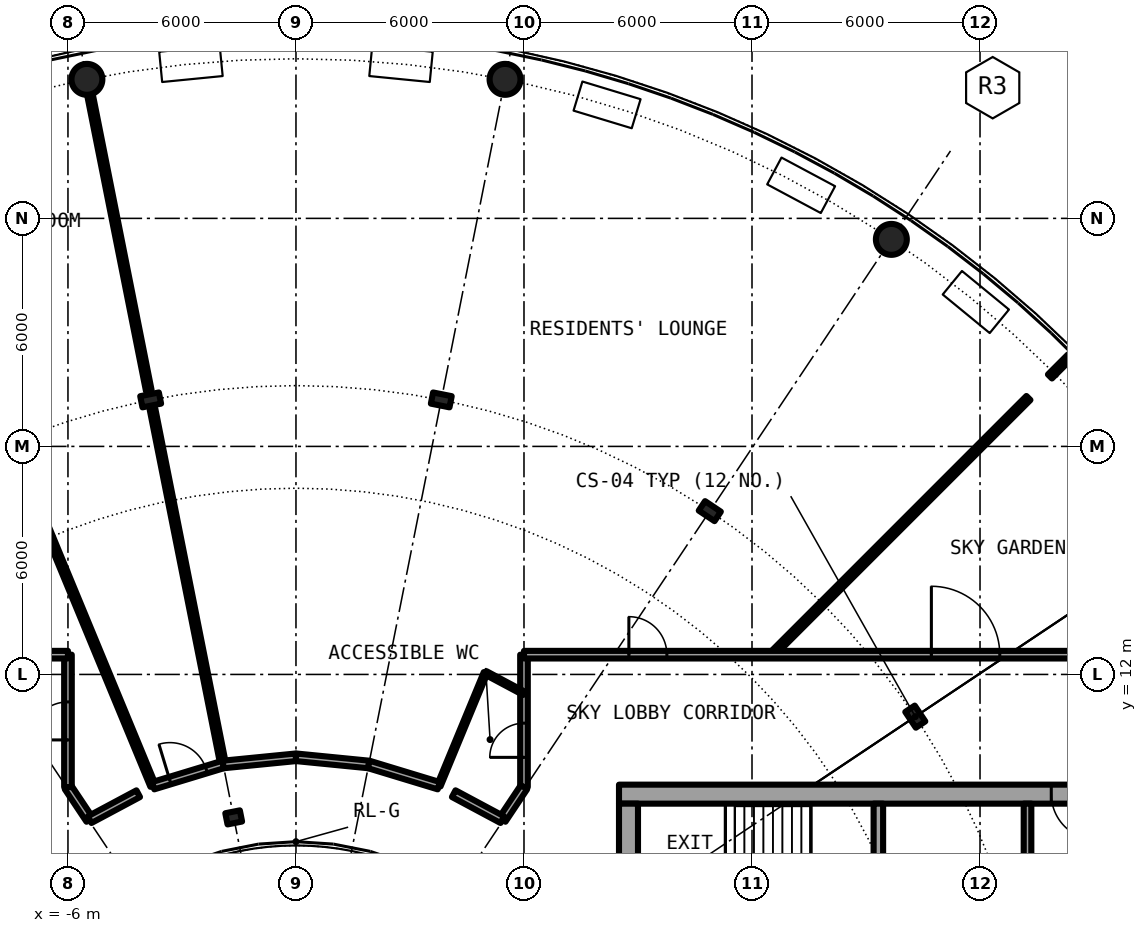
"""IFC4 building model, lengths in metres.
Left out: names, types, materials, properties, quantities, classifications, styles, units other than length and angle.
Written with IfcOpenShell. Run it as: python <this file> out.ifc"""

import sys

from ifc_helpers import new_model, si_unit, direction, frame, frame_2d, origin, origin_2d, place, context, subcontext, project, spatial, rectangle, hollow_circle, i_section, extrude, element, fill, save


model = new_model("IFC4")
c1 = context("Model", 3, precision=1e-05, world=origin(), true_north=direction((0.0, 1.0)))
c2 = subcontext(c1, "Body", "Model", "MODEL_VIEW")
j1 = project(units=[si_unit("LENGTHUNIT", "METRE"), si_unit("PLANEANGLEUNIT", "RADIAN")], contexts=[c1])
p1 = place(None, origin())
s1 = spatial("IfcSite", under=j1, at=p1, CompositionType="ELEMENT")
p2 = place(p1, origin())
s2 = spatial("IfcBuilding", under=s1, at=p2, CompositionType="ELEMENT")
p3 = place(p2, frame((0.0, 0.0, 179.9)))
s3 = spatial("IfcBuildingStorey", under=s2, at=p3, CompositionType="ELEMENT", Elevation=179.9)
for number, where, z_axis, x_axis in (
    (1, (15.667, 23.448, 0.0), (0.0, 0.0, 1.0), (1.0, 0.0, 0.0)),
    (2, (5.501, 27.658, 0.0), (0.0, 0.0, 1.0), (1.0, 0.0, 0.0)),
    (3, (-5.501, 27.658, 0.0), (0.0, 0.0, 1.0), (1.0, 0.0, 0.0)),
):
    element("IfcColumn", number, at=place(p3, frame(where, z_axis=z_axis, x_axis=x_axis)), inside=s3, PredefinedType="COLUMN", context=c2, shape_type="SweptSolid", body=[
        extrude(hollow_circle(Radius=0.406, WallThickness=0.04, at=origin_2d()), origin(), (0.0, 0.0, 1.0), 6.1),
    ])
for number, where, z_axis, x_axis in (
    (4, (16.297, 10.889, 0.0), (0.0, 0.0, 1.0), (0.831, 0.556, 0.0)),
    (5, (10.889, 16.297, 0.0), (0.0, 0.0, 1.0), (0.556, 0.831, 0.0)),
    (6, (3.824, 19.223, 0.0), (0.0, 0.0, 1.0), (0.195, 0.981, 0.0)),
    (7, (-3.824, 19.223, 0.0), (0.0, 0.0, 1.0), (-0.195, 0.981, 0.0)),
):
    element("IfcColumn", number, at=place(p3, frame(where, z_axis=z_axis, x_axis=x_axis)), inside=s3, PredefinedType="COLUMN", context=c2, shape_type="SweptSolid", body=[
        extrude(i_section(OverallWidth=0.3, OverallDepth=0.5, WebThickness=0.014, FlangeThickness=0.028, FilletRadius=0.027, at=origin_2d()), origin(), (0.0, 0.0, 1.0), 6.1),
    ])
p4 = place(p3, frame((-1.639, 8.239, 0.0), z_axis=(0.0, 0.0, 1.0), x_axis=(-0.195090322016, 0.980785280403, 0.0)))
e8 = element("IfcColumn", 8, at=p4, inside=s3, PredefinedType="COLUMN", context=c2, shape_type="SweptSolid", body=[
    extrude(i_section(OverallWidth=0.3, OverallDepth=0.39, WebThickness=0.011, FlangeThickness=0.019, FilletRadius=0.027, at=origin_2d()), origin(), (0.0, 0.0, 1.0), 6.1),
])
p5 = place(p3, frame((22.1, 8.85, 0.0), z_axis=(0.0, 0.0, 1.0), x_axis=(-1.0, 0.0, 0.0)))
e9 = element("IfcWall", 9, at=p5, inside=s3, PredefinedType="SHEAR", context=c2, shape_type="SweptSolid", body=[
    extrude(rectangle(XDim=13.6, YDim=0.5, at=frame_2d((6.8, 0.0))), origin(), (0.0, 0.0, 1.0), 6.1),
])
p6 = place(p5, frame((1.025, 0.0, 0.0)))
e10 = element("IfcOpeningElement", 10, at=p6, cuts=e9, PredefinedType="OPENING", context=c2, shape_type="SweptSolid", body=[
    extrude(rectangle(XDim=1.2, YDim=2.3, at=frame_2d((0.6, 1.15))), frame((0.0, 0.26, 0.0), z_axis=(0.0, -1.0, 0.0), x_axis=(1.0, 0.0, 0.0)), (0.0, 0.0, 1.0), 0.52),
])
p7 = place(p3, frame((8.75, -8.6, 0.0), z_axis=(0.0, 0.0, 1.0), x_axis=(0.0, 1.0, 0.0)))
e11 = element("IfcWall", 11, at=p7, inside=s3, PredefinedType="SHEAR", context=c2, shape_type="SweptSolid", body=[
    extrude(rectangle(XDim=17.2, YDim=0.5, at=frame_2d((8.6, 0.0))), origin(), (0.0, 0.0, 1.0), 6.1),
])
p8 = place(p7, frame((7.4, 0.0, 0.1)))
e12 = element("IfcOpeningElement", 12, at=p8, cuts=e11, PredefinedType="OPENING", context=c2, shape_type="SweptSolid", body=[
    extrude(rectangle(XDim=2.4, YDim=2.2, at=frame_2d((1.2, 1.1))), frame((0.0, 0.26, 0.0), z_axis=(0.0, -1.0, 0.0), x_axis=(1.0, 0.0, 0.0)), (0.0, 0.0, 1.0), 0.52),
])
p9 = place(p3, frame((15.325, 4.65, 0.0), z_axis=(0.0, 0.0, 1.0), x_axis=(0.0, 1.0, 0.0)))
e13 = element("IfcWall", 13, at=p9, inside=s3, PredefinedType="SHEAR", context=c2, shape_type="SweptSolid", body=[
    extrude(rectangle(XDim=3.95, YDim=0.25, at=frame_2d((1.975, 0.0))), origin(), (0.0, 0.0, 1.0), 6.1),
])
p10 = place(p9, frame((1.375, 0.0, 0.0)))
e14 = element("IfcOpeningElement", 14, at=p10, cuts=e13, PredefinedType="OPENING", context=c2, shape_type="SweptSolid", body=[
    extrude(rectangle(XDim=1.2, YDim=2.3, at=frame_2d((0.6, 1.15))), frame((0.0, 0.135, 0.0), z_axis=(0.0, -1.0, 0.0), x_axis=(1.0, 0.0, 0.0)), (0.0, 0.0, 1.0), 0.27),
])
p11 = place(p3, frame((19.25, 1.575, 0.0), z_axis=(0.0, 0.0, 1.0), x_axis=(0.0, 1.0, 0.0)))
e15 = element("IfcWall", 15, at=p11, inside=s3, PredefinedType="SOLIDWALL", context=c2, shape_type="SweptSolid", body=[
    extrude(rectangle(XDim=7.025, YDim=0.2, at=frame_2d((3.513, 0.0))), origin(), (0.0, 0.0, 1.0), 5.7),
])
p12 = place(p11, frame((4.475, 0.0, 0.0)))
e16 = element("IfcOpeningElement", 16, at=p12, cuts=e15, PredefinedType="OPENING", context=c2, shape_type="SweptSolid", body=[
    extrude(rectangle(XDim=1.1, YDim=2.3, at=frame_2d((0.55, 1.15))), frame((0.0, 0.11, 0.0), z_axis=(0.0, -1.0, 0.0), x_axis=(1.0, 0.0, 0.0)), (0.0, 0.0, 1.0), 0.22),
])
p13 = place(p3, frame((6.0, 9.034, 0.0), z_axis=(0.0, 0.0, 1.0), x_axis=(0.0, 1.0, 0.0)))
e17 = element("IfcWall", 17, at=p13, inside=s3, PredefinedType="PARTITIONING", context=c2, shape_type="SweptSolid", body=[
    extrude(rectangle(XDim=3.486, YDim=0.2, at=frame_2d((1.743, 0.0))), origin(), (0.0, 0.0, 1.0), 5.7),
])
p14 = place(p13, frame((0.784, 0.0, 0.0)))
e18 = element("IfcOpeningElement", 18, at=p14, cuts=e17, PredefinedType="OPENING", context=c2, shape_type="SweptSolid", body=[
    extrude(rectangle(XDim=0.9, YDim=2.3, at=frame_2d((0.45, 1.15))), frame((0.0, 0.11, 0.0), z_axis=(0.0, -1.0, 0.0), x_axis=(1.0, 0.0, 0.0)), (0.0, 0.0, 1.0), 0.22),
])
p15 = place(p3, frame((-10.431, 25.183, 0.0), z_axis=(0.0, 0.0, 1.0), x_axis=(0.382491934833, -0.923958830137, 0.0)))
e19 = element("IfcWall", 19, at=p15, inside=s3, PredefinedType="PARTITIONING", context=c2, shape_type="SweptSolid", body=[
    extrude(rectangle(XDim=17.438, YDim=0.15, at=frame_2d((8.719, 0.0))), origin(), (0.0, 0.0, 1.0), 5.7),
])
p16 = place(p3, frame((-5.424, 27.267, 0.0), z_axis=(0.0, 0.0, 1.0), x_axis=(0.195076736895, -0.980787982554, 0.0)))
e20 = element("IfcWall", 20, at=p16, inside=s3, PredefinedType="PARTITIONING", context=c2, shape_type="SweptSolid", body=[
    extrude(rectangle(XDim=7.951, YDim=0.15, at=frame_2d((3.976, 0.0))), origin(), (0.0, 0.0, 1.0), 5.7),
])
p17 = place(p3, frame((-3.775, 18.978, 0.0), z_axis=(0.0, 0.0, 1.0), x_axis=(0.195056807593, -0.980791946241, 0.0)))
e21 = element("IfcWall", 21, at=p17, inside=s3, PredefinedType="PARTITIONING", context=c2, shape_type="SweptSolid", body=[
    extrude(rectangle(XDim=9.53, YDim=0.15, at=frame_2d((4.765, 0.0))), origin(), (0.0, 0.0, 1.0), 5.7),
])
p18 = place(p3, frame((3.758, 9.072, 0.0), z_axis=(0.0, 0.0, 1.0), x_axis=(0.382517205945, 0.923948368231, 0.0)))
e22 = element("IfcWall", 22, at=p18, inside=s3, PredefinedType="PARTITIONING", context=c2, shape_type="SweptSolid", body=[
    extrude(rectangle(XDim=3.216, YDim=0.1, at=frame_2d((1.608, 0.0))), origin(), (0.0, 0.0, 1.0), 5.7),
])
p19 = place(p3, frame((12.52, 12.52, 0.0), z_axis=(0.0, 0.0, 1.0), x_axis=(0.707106781187, 0.707106781187, 0.0)))
e23 = element("IfcWall", 23, at=p19, inside=s3, PredefinedType="PARTITIONING", context=c2, shape_type="SweptSolid", body=[
    extrude(rectangle(XDim=9.552, YDim=0.15, at=frame_2d((4.776, 0.0))), origin(), (0.0, 0.0, 1.0), 5.7),
])
p20 = place(p3, frame((19.84, 19.84, 0.0), z_axis=(0.0, 0.0, 1.0), x_axis=(0.707106781187, 0.707106781187, 0.0)))
e24 = element("IfcWall", 24, at=p20, inside=s3, PredefinedType="PARTITIONING", context=c2, shape_type="SweptSolid", body=[
    extrude(rectangle(XDim=0.742, YDim=0.15, at=frame_2d((0.371, 0.0))), origin(), (0.0, 0.0, 1.0), 5.7),
])
for number, where, z_axis, x_axis in (
    (25, (-6.0, 9.034, 0.0), (0.0, 0.0, 1.0), (0.555, -0.832, 0.0)),
    (26, (5.429, 8.179, 0.0), (0.0, 0.0, 1.0), (0.555, 0.832, 0.0)),
):
    element("IfcWall", number, at=place(p3, frame(where, z_axis=z_axis, x_axis=x_axis)), inside=s3, PredefinedType="PARTITIONING", context=c2, shape_type="SweptSolid", body=[
        extrude(rectangle(XDim=1.028, YDim=0.2, at=frame_2d((0.514, 0.0))), origin(), (0.0, 0.0, 1.0), 5.7),
    ])
p21 = place(p3, frame((-6.0, 9.034, 0.0), z_axis=(0.0, 0.0, 1.0), x_axis=(0.0, 1.0, 0.0)))
e27 = element("IfcWall", 27, at=p21, inside=s3, PredefinedType="PARTITIONING", context=c2, shape_type="SweptSolid", body=[
    extrude(rectangle(XDim=3.486, YDim=0.2, at=frame_2d((1.743, 0.0))), origin(), (0.0, 0.0, 1.0), 5.7),
])
p22 = place(p21, frame((1.243, 0.0, 0.0)))
e28 = element("IfcOpeningElement", 28, at=p22, cuts=e27, PredefinedType="OPENING", context=c2, shape_type="SweptSolid", body=[
    extrude(rectangle(XDim=1.0, YDim=2.3, at=frame_2d((0.5, 1.15))), frame((0.0, 0.11, 0.0), z_axis=(0.0, -1.0, 0.0), x_axis=(1.0, 0.0, 0.0)), (0.0, 0.0, 1.0), 0.22),
])
p23 = place(p3, frame((-5.429, 8.179, 0.0), z_axis=(0.0, 0.0, 1.0), x_axis=(0.88193287619, 0.471375011954, 0.0)))
e29 = element("IfcWall", 29, at=p23, inside=s3, PredefinedType="PARTITIONING", context=c2, shape_type="SweptSolid", body=[
    extrude(rectangle(XDim=1.449, YDim=0.2, at=frame_2d((0.725, 0.0))), origin(), (0.0, 0.0, 1.0), 5.7),
])
p24 = place(p3, frame((-3.758, 9.072, 0.0), z_axis=(0.0, 0.0, 1.0), x_axis=(0.956896312675, 0.29042976223, 0.0)))
e30 = element("IfcWall", 30, at=p24, inside=s3, PredefinedType="PARTITIONING", context=c2, shape_type="SweptSolid", body=[
    extrude(rectangle(XDim=1.925, YDim=0.2, at=frame_2d((0.962, 0.0))), origin(), (0.0, 0.0, 1.0), 5.7),
])
p25 = place(p24, frame((0.462, 0.0, 0.0)))
e31 = element("IfcOpeningElement", 31, at=p25, cuts=e30, PredefinedType="OPENING", context=c2, shape_type="SweptSolid", body=[
    extrude(rectangle(XDim=1.0, YDim=2.3, at=frame_2d((0.5, 1.15))), frame((0.0, 0.11, 0.0), z_axis=(0.0, -1.0, 0.0), x_axis=(1.0, 0.0, 0.0)), (0.0, 0.0, 1.0), 0.22),
])
for number, where, z_axis, x_axis in (
    (32, (-1.916, 9.631, 0.0), (0.0, 0.0, 1.0), (0.995, 0.098, 0.0)),
    (33, (0.0, 9.82, 0.0), (0.0, 0.0, 1.0), (0.995, -0.098, 0.0)),
):
    element("IfcWall", number, at=place(p3, frame(where, z_axis=z_axis, x_axis=x_axis)), inside=s3, PredefinedType="PARTITIONING", context=c2, shape_type="SweptSolid", body=[
        extrude(rectangle(XDim=1.925, YDim=0.2, at=frame_2d((0.963, 0.0))), origin(), (0.0, 0.0, 1.0), 5.7),
    ])
p26 = place(p3, frame((1.916, 9.631, 0.0), z_axis=(0.0, 0.0, 1.0), x_axis=(0.956896312675, -0.29042976223, 0.0)))
e34 = element("IfcWall", 34, at=p26, inside=s3, PredefinedType="PARTITIONING", context=c2, shape_type="SweptSolid", body=[
    extrude(rectangle(XDim=1.925, YDim=0.2, at=frame_2d((0.962, 0.0))), origin(), (0.0, 0.0, 1.0), 5.7),
])
p27 = place(p3, frame((4.151, 8.863, 0.0), z_axis=(0.0, 0.0, 1.0), x_axis=(0.881652665802, -0.471898905364, 0.0)))
e35 = element("IfcWall", 35, at=p27, inside=s3, PredefinedType="PARTITIONING", context=c2, shape_type="SweptSolid", body=[
    extrude(rectangle(XDim=1.45, YDim=0.2, at=frame_2d((0.725, 0.0))), origin(), (0.0, 0.0, 1.0), 5.7),
])
p28 = place(p3, frame((-21.9, 12.52, 0.0), z_axis=(0.0, 0.0, 1.0), x_axis=(1.0, 0.0, 0.0)))
e36 = element("IfcWall", 36, at=p28, inside=s3, PredefinedType="PARTITIONING", context=c2, shape_type="SweptSolid", body=[
    extrude(rectangle(XDim=15.9, YDim=0.2, at=frame_2d((7.95, 0.0))), origin(), (0.0, 0.0, 1.0), 5.7),
])
p29 = place(p28, frame((10.957, 0.0, 0.0)))
e37 = element("IfcOpeningElement", 37, at=p29, cuts=e36, PredefinedType="OPENING", context=c2, shape_type="SweptSolid", body=[
    extrude(rectangle(XDim=1.0, YDim=2.3, at=frame_2d((0.5, 1.15))), frame((0.0, 0.11, 0.0), z_axis=(0.0, -1.0, 0.0), x_axis=(1.0, 0.0, 0.0)), (0.0, 0.0, 1.0), 0.22),
])
p30 = place(p28, frame((3.45, 0.0, 0.0)))
e38 = element("IfcOpeningElement", 38, at=p30, cuts=e36, PredefinedType="OPENING", context=c2, shape_type="SweptSolid", body=[
    extrude(rectangle(XDim=1.8, YDim=2.3, at=frame_2d((0.9, 1.15))), frame((0.0, 0.11, 0.0), z_axis=(0.0, -1.0, 0.0), x_axis=(1.0, 0.0, 0.0)), (0.0, 0.0, 1.0), 0.22),
])
p31 = place(p3, frame((6.0, 12.52, 0.0), z_axis=(0.0, 0.0, 1.0), x_axis=(1.0, 0.0, 0.0)))
e39 = element("IfcWall", 39, at=p31, inside=s3, PredefinedType="PARTITIONING", context=c2, shape_type="SweptSolid", body=[
    extrude(rectangle(XDim=15.9, YDim=0.2, at=frame_2d((7.95, 0.0))), origin(), (0.0, 0.0, 1.0), 5.7),
])
p32 = place(p31, frame((2.76, 0.0, 0.0)))
e40 = element("IfcOpeningElement", 40, at=p32, cuts=e39, PredefinedType="OPENING", context=c2, shape_type="SweptSolid", body=[
    extrude(rectangle(XDim=1.0, YDim=2.3, at=frame_2d((0.5, 1.15))), frame((0.0, 0.11, 0.0), z_axis=(0.0, -1.0, 0.0), x_axis=(1.0, 0.0, 0.0)), (0.0, 0.0, 1.0), 0.22),
])
p33 = place(p31, frame((10.72, 0.0, 0.0)))
e41 = element("IfcOpeningElement", 41, at=p33, cuts=e39, PredefinedType="OPENING", context=c2, shape_type="SweptSolid", body=[
    extrude(rectangle(XDim=1.8, YDim=2.3, at=frame_2d((0.9, 1.15))), frame((0.0, 0.11, 0.0), z_axis=(0.0, -1.0, 0.0), x_axis=(1.0, 0.0, 0.0)), (0.0, 0.0, 1.0), 0.22),
])
p34 = place(p3, frame((4.988, 12.043, 0.0), z_axis=(0.0, 0.0, 1.0), x_axis=(0.882235076446, -0.470809165042, 0.0)))
e42 = element("IfcWall", 42, at=p34, inside=s3, PredefinedType="PARTITIONING", context=c2, shape_type="SweptSolid", body=[
    extrude(rectangle(XDim=1.147, YDim=0.1, at=frame_2d((0.573, 0.0))), origin(), (0.0, 0.0, 1.0), 5.7),
])
p35 = place(p6, origin())
e43 = element("IfcDoor", 43, at=p35, inside=s3, OperationType="SINGLE_SWING_RIGHT", PredefinedType="DOOR", context=c2, shape_type="SweptSolid", body=[
    extrude(rectangle(XDim=1.2, YDim=2.3, at=frame_2d((0.6, 1.15))), frame((0.0, 0.025, 0.0), z_axis=(0.0, -1.0, 0.0), x_axis=(1.0, 0.0, 0.0)), (0.0, 0.0, 1.0), 0.05),
])
fill(e10, e43)
p36 = place(p14, origin())
e44 = element("IfcDoor", 44, at=p36, inside=s3, OperationType="SINGLE_SWING_LEFT", PredefinedType="DOOR", context=c2, shape_type="SweptSolid", body=[
    extrude(rectangle(XDim=0.9, YDim=2.3, at=frame_2d((0.45, 1.15))), frame((0.0, 0.025, 0.0), z_axis=(0.0, -1.0, 0.0), x_axis=(1.0, 0.0, 0.0)), (0.0, 0.0, 1.0), 0.05),
])
fill(e18, e44)
p37 = place(p32, origin())
e45 = element("IfcDoor", 45, at=p37, inside=s3, OperationType="SINGLE_SWING_LEFT", PredefinedType="DOOR", context=c2, shape_type="SweptSolid", body=[
    extrude(rectangle(XDim=1.0, YDim=2.3, at=frame_2d((0.5, 1.15))), frame((0.0, 0.025, 0.0), z_axis=(0.0, -1.0, 0.0), x_axis=(1.0, 0.0, 0.0)), (0.0, 0.0, 1.0), 0.05),
])
fill(e40, e45)
p38 = place(p25, origin())
e46 = element("IfcDoor", 46, at=p38, inside=s3, OperationType="SINGLE_SWING_RIGHT", PredefinedType="DOOR", context=c2, shape_type="SweptSolid", body=[
    extrude(rectangle(XDim=1.0, YDim=2.3, at=frame_2d((0.5, 1.15))), frame((0.0, 0.025, 0.0), z_axis=(0.0, -1.0, 0.0), x_axis=(1.0, 0.0, 0.0)), (0.0, 0.0, 1.0), 0.05),
])
fill(e31, e46)
p39 = place(p22, origin())
e47 = element("IfcDoor", 47, at=p39, inside=s3, OperationType="SINGLE_SWING_RIGHT", PredefinedType="DOOR", context=c2, shape_type="SweptSolid", body=[
    extrude(rectangle(XDim=1.0, YDim=2.3, at=frame_2d((0.5, 1.15))), frame((0.0, 0.025, 0.0), z_axis=(0.0, -1.0, 0.0), x_axis=(1.0, 0.0, 0.0)), (0.0, 0.0, 1.0), 0.05),
])
fill(e28, e47)
p40 = place(p33, origin())
e48 = element("IfcDoor", 48, at=p40, inside=s3, OperationType="DOUBLE_DOOR_SINGLE_SWING", PredefinedType="DOOR", context=c2, shape_type="SweptSolid", body=[
    extrude(rectangle(XDim=1.8, YDim=2.3, at=frame_2d((0.9, 1.15))), frame((0.0, 0.025, 0.0), z_axis=(0.0, -1.0, 0.0), x_axis=(1.0, 0.0, 0.0)), (0.0, 0.0, 1.0), 0.05),
])
fill(e41, e48)
save(model, sys.argv[1])
